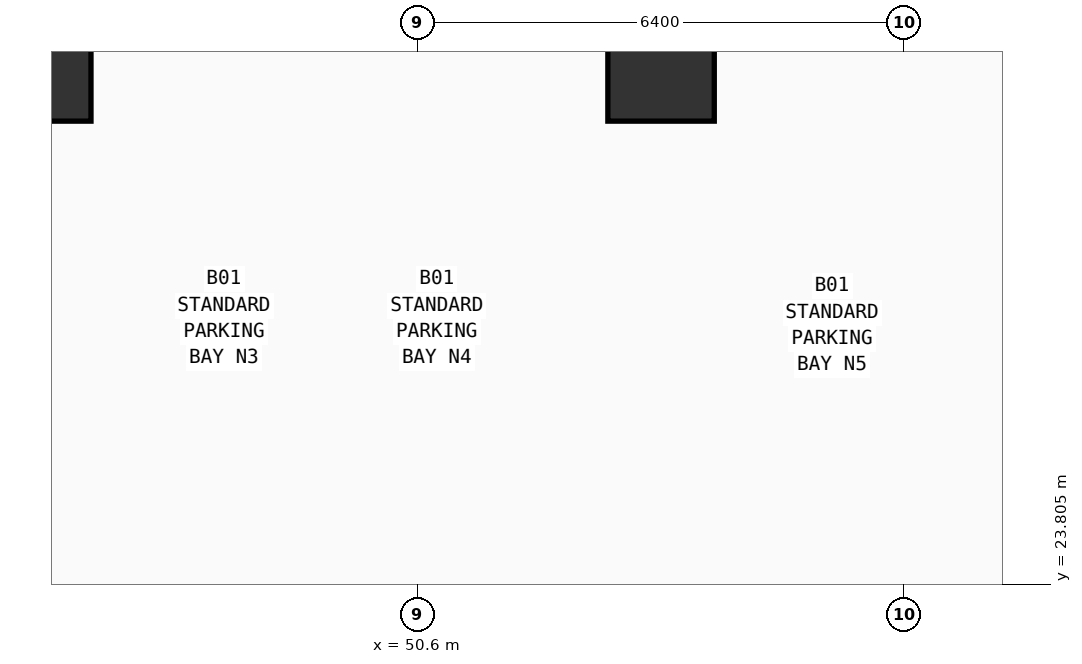
"""IFC4 building model, lengths in metres.
Left out: names, types, materials, properties, quantities, classifications, styles, units other than length and angle.
Written with IfcOpenShell. Run it as: python <this file> out.ifc"""

import sys

from ifc_helpers import new_model, si_unit, direction, frame, origin, origin_2d, place, context, subcontext, project, spatial, rectangle, extrude, element, save


model = new_model("IFC4")
c1 = context("Model", 3, precision=1e-05, world=origin(), true_north=direction((0.0, 1.0)))
c2 = subcontext(c1, "Body", "Model", "MODEL_VIEW")
j1 = project(units=[si_unit("LENGTHUNIT", "METRE"), si_unit("PLANEANGLEUNIT", "RADIAN")], contexts=[c1])
p1 = place(None, origin())
s1 = spatial("IfcSite", under=j1, at=p1, CompositionType="ELEMENT")
p2 = place(p1, origin())
s2 = spatial("IfcBuilding", under=s1, at=p2, CompositionType="ELEMENT")
p3 = place(p2, frame((0.0, 0.0, -4.2)))
s3 = spatial("IfcBuildingStorey", under=s2, at=p3, CompositionType="ELEMENT", Elevation=-4.2)
for number, where, z_axis, x_axis in (
    (1, (45.6, 30.6, 0.0), (0.0, 0.0, 1.0), (1.0, 0.0, 0.0)),
    (2, (53.8, 30.6, 0.0), (0.0, 0.0, 1.0), (1.0, 0.0, 0.0)),
):
    element("IfcColumn", number, at=place(p3, frame(where, z_axis=z_axis, x_axis=x_axis)), inside=s3, PredefinedType="COLUMN", context=c2, shape_type="SweptSolid", body=[
        extrude(rectangle(XDim=1.4, YDim=1.4, at=origin_2d()), origin(), (0.0, 0.0, 1.0), 3.82),
    ])
save(model, sys.argv[1])
